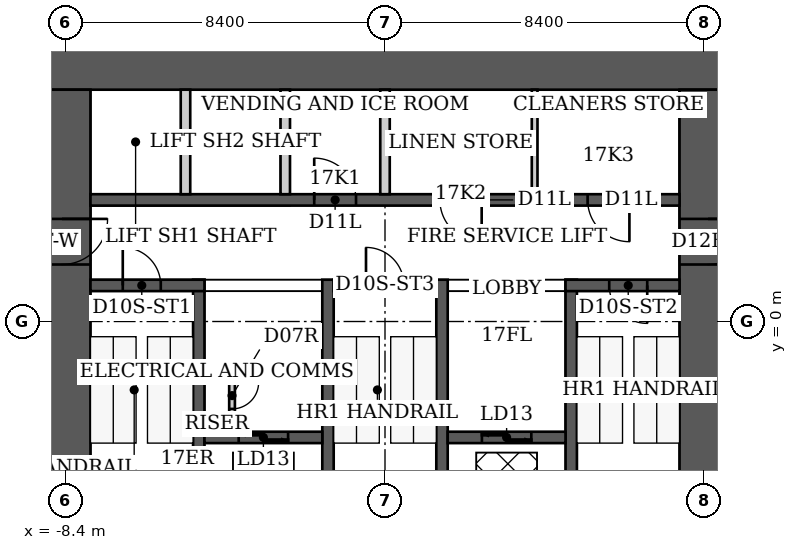
"""IFC4 building model, lengths in metres.
Left out: names, types, materials, properties, quantities, classifications, styles, units other than length and angle.
Written with IfcOpenShell. Run it as: python <this file> out.ifc"""

import sys

from ifc_helpers import new_model, si_unit, direction, frame, frame_2d, origin, place, context, subcontext, project, spatial, rectangle, extrude, element, fill, save


model = new_model("IFC4")
c1 = context("Model", 3, precision=1e-05, world=origin(), true_north=direction((0.0, 1.0)))
c2 = subcontext(c1, "Body", "Model", "MODEL_VIEW")
j1 = project(units=[si_unit("LENGTHUNIT", "METRE"), si_unit("PLANEANGLEUNIT", "RADIAN")], contexts=[c1])
p1 = place(None, origin())
s1 = spatial("IfcSite", under=j1, at=p1, CompositionType="ELEMENT")
p2 = place(p1, origin())
s2 = spatial("IfcBuilding", under=s1, at=p2, CompositionType="ELEMENT")
p3 = place(p2, frame((0.0, 0.0, 72.4)))
s3 = spatial("IfcBuildingStorey", under=s2, at=p3, CompositionType="ELEMENT", Elevation=72.4)
p4 = place(p3, frame((-9.25, 6.85, 0.0), z_axis=(0.0, 0.0, 1.0), x_axis=(1.0, 0.0, 0.0)))
e1 = element("IfcWall", 1, at=p4, inside=s3, PredefinedType="SHEAR", context=c2, shape_type="SweptSolid", body=[
    extrude(rectangle(XDim=18.5, YDim=1.5, at=frame_2d((9.25, 0.0))), origin(), (0.0, 0.0, 1.0), 3.8),
])
p5 = place(p3, frame((-8.5, -9.2, 0.0), z_axis=(0.0, 0.0, 1.0), x_axis=(0.0, 1.0, 0.0)))
e2 = element("IfcWall", 2, at=p5, inside=s3, PredefinedType="SHEAR", context=c2, shape_type="SweptSolid", body=[
    extrude(rectangle(XDim=15.3, YDim=1.5, at=frame_2d((7.65, 0.0))), origin(), (0.0, 0.0, 1.0), 3.8),
])
p6 = place(p5, frame((10.7, 0.0, 0.0)))
e3 = element("IfcOpeningElement", 3, at=p6, cuts=e2, PredefinedType="OPENING", context=c2, shape_type="SweptSolid", body=[
    extrude(rectangle(XDim=1.2, YDim=2.2, at=frame_2d((0.6, 1.1))), frame((0.0, 0.75, 0.0), z_axis=(0.0, -1.0, 0.0), x_axis=(1.0, 0.0, 0.0)), (0.0, 0.0, 1.0), 1.5),
])
p7 = place(p3, frame((8.5, -9.2, 0.0), z_axis=(0.0, 0.0, 1.0), x_axis=(0.0, 1.0, 0.0)))
e4 = element("IfcWall", 4, at=p7, inside=s3, PredefinedType="SHEAR", context=c2, shape_type="SweptSolid", body=[
    extrude(rectangle(XDim=15.3, YDim=1.5, at=frame_2d((7.65, 0.0))), origin(), (0.0, 0.0, 1.0), 3.8),
])
p8 = place(p7, frame((10.7, 0.0, 0.0)))
e5 = element("IfcOpeningElement", 5, at=p8, cuts=e4, PredefinedType="OPENING", context=c2, shape_type="SweptSolid", body=[
    extrude(rectangle(XDim=1.2, YDim=2.2, at=frame_2d((0.6, 1.1))), frame((0.0, 0.75, 0.0), z_axis=(0.0, -1.0, 0.0), x_axis=(1.0, 0.0, 0.0)), (0.0, 0.0, 1.0), 1.5),
])
for number, where, z_axis, x_axis in (
    (6, (-4.9, -6.1, 0.0), (0.0, 0.0, 1.0), (0.0, 1.0, 0.0)),
    (7, (-1.5, -6.1, 0.0), (0.0, 0.0, 1.0), (0.0, 1.0, 0.0)),
    (8, (1.5, -6.1, 0.0), (0.0, 0.0, 1.0), (0.0, 1.0, 0.0)),
    (9, (4.9, -6.1, 0.0), (0.0, 0.0, 1.0), (0.0, 1.0, 0.0)),
):
    element("IfcWall", number, at=place(p3, frame(where, z_axis=z_axis, x_axis=x_axis)), inside=s3, PredefinedType="SHEAR", context=c2, shape_type="SweptSolid", body=[
        extrude(rectangle(XDim=7.2, YDim=0.3, at=frame_2d((3.6, 0.0))), origin(), (0.0, 0.0, 1.0), 3.8),
    ])
p9 = place(p3, frame((-7.75, 0.95, 0.0), z_axis=(0.0, 0.0, 1.0), x_axis=(1.0, 0.0, 0.0)))
e10 = element("IfcWall", 10, at=p9, inside=s3, PredefinedType="SHEAR", context=c2, shape_type="SweptSolid", body=[
    extrude(rectangle(XDim=3.0, YDim=0.3, at=frame_2d((1.5, 0.0))), origin(), (0.0, 0.0, 1.0), 3.8),
])
p10 = place(p9, frame((0.85, 0.0, 0.0)))
e11 = element("IfcOpeningElement", 11, at=p10, cuts=e10, PredefinedType="OPENING", context=c2, shape_type="SweptSolid", body=[
    extrude(rectangle(XDim=1.0, YDim=2.2, at=frame_2d((0.5, 1.1))), frame((0.0, 0.15, 0.0), z_axis=(0.0, -1.0, 0.0), x_axis=(1.0, 0.0, 0.0)), (0.0, 0.0, 1.0), 0.3),
])
p11 = place(p3, frame((-1.35, 0.95, 0.0), z_axis=(0.0, 0.0, 1.0), x_axis=(1.0, 0.0, 0.0)))
e12 = element("IfcWall", 12, at=p11, inside=s3, PredefinedType="SHEAR", context=c2, shape_type="SweptSolid", body=[
    extrude(rectangle(XDim=2.7, YDim=0.3, at=frame_2d((1.35, 0.0))), origin(), (0.0, 0.0, 1.0), 3.8),
])
p12 = place(p11, frame((0.85, 0.0, 0.0)))
e13 = element("IfcOpeningElement", 13, at=p12, cuts=e12, PredefinedType="OPENING", context=c2, shape_type="SweptSolid", body=[
    extrude(rectangle(XDim=1.0, YDim=2.2, at=frame_2d((0.5, 1.1))), frame((0.0, 0.15, 0.0), z_axis=(0.0, -1.0, 0.0), x_axis=(1.0, 0.0, 0.0)), (0.0, 0.0, 1.0), 0.3),
])
p13 = place(p3, frame((4.75, 0.95, 0.0), z_axis=(0.0, 0.0, 1.0), x_axis=(1.0, 0.0, 0.0)))
e14 = element("IfcWall", 14, at=p13, inside=s3, PredefinedType="SHEAR", context=c2, shape_type="SweptSolid", body=[
    extrude(rectangle(XDim=3.0, YDim=0.3, at=frame_2d((1.5, 0.0))), origin(), (0.0, 0.0, 1.0), 3.8),
])
p14 = place(p13, frame((1.15, 0.0, 0.0)))
e15 = element("IfcOpeningElement", 15, at=p14, cuts=e14, PredefinedType="OPENING", context=c2, shape_type="SweptSolid", body=[
    extrude(rectangle(XDim=1.0, YDim=2.2, at=frame_2d((0.5, 1.1))), frame((0.0, 0.15, 0.0), z_axis=(0.0, -1.0, 0.0), x_axis=(1.0, 0.0, 0.0)), (0.0, 0.0, 1.0), 0.3),
])
p15 = place(p3, frame((-4.75, -3.05, 0.0), z_axis=(0.0, 0.0, 1.0), x_axis=(1.0, 0.0, 0.0)))
e16 = element("IfcWall", 16, at=p15, inside=s3, PredefinedType="SHEAR", context=c2, shape_type="SweptSolid", body=[
    extrude(rectangle(XDim=3.1, YDim=0.3, at=frame_2d((1.55, 0.0))), origin(), (0.0, 0.0, 1.0), 3.8),
])
p16 = place(p15, frame((0.9, 0.0, 0.0)))
e17 = element("IfcOpeningElement", 17, at=p16, cuts=e16, PredefinedType="OPENING", context=c2, shape_type="SweptSolid", body=[
    extrude(rectangle(XDim=1.3, YDim=2.1, at=frame_2d((0.65, 1.05))), frame((0.0, 0.15, 0.0), z_axis=(0.0, -1.0, 0.0), x_axis=(1.0, 0.0, 0.0)), (0.0, 0.0, 1.0), 0.3),
])
p17 = place(p3, frame((1.65, -3.05, 0.0), z_axis=(0.0, 0.0, 1.0), x_axis=(1.0, 0.0, 0.0)))
e18 = element("IfcWall", 18, at=p17, inside=s3, PredefinedType="SHEAR", context=c2, shape_type="SweptSolid", body=[
    extrude(rectangle(XDim=3.1, YDim=0.3, at=frame_2d((1.55, 0.0))), origin(), (0.0, 0.0, 1.0), 3.8),
])
p18 = place(p17, frame((0.9, 0.0, 0.0)))
e19 = element("IfcOpeningElement", 19, at=p18, cuts=e18, PredefinedType="OPENING", context=c2, shape_type="SweptSolid", body=[
    extrude(rectangle(XDim=1.3, YDim=2.1, at=frame_2d((0.65, 1.05))), frame((0.0, 0.15, 0.0), z_axis=(0.0, -1.0, 0.0), x_axis=(1.0, 0.0, 0.0)), (0.0, 0.0, 1.0), 0.3),
])
p19 = place(p3, frame((-7.75, 3.2, 0.0), z_axis=(0.0, 0.0, 1.0), x_axis=(1.0, 0.0, 0.0)))
e20 = element("IfcWall", 20, at=p19, inside=s3, PredefinedType="SHEAR", context=c2, shape_type="SweptSolid", body=[
    extrude(rectangle(XDim=15.5, YDim=0.3, at=frame_2d((7.75, 0.0))), origin(), (0.0, 0.0, 1.0), 3.8),
])
p20 = place(p19, frame((5.887, 0.0, 0.0)))
e21 = element("IfcOpeningElement", 21, at=p20, cuts=e20, PredefinedType="OPENING", context=c2, shape_type="SweptSolid", body=[
    extrude(rectangle(XDim=1.1, YDim=2.2, at=frame_2d((0.55, 1.1))), frame((0.0, 0.15, 0.0), z_axis=(0.0, -1.0, 0.0), x_axis=(1.0, 0.0, 0.0)), (0.0, 0.0, 1.0), 0.3),
])
p21 = place(p19, frame((9.194, 0.0, 0.0)))
e22 = element("IfcOpeningElement", 22, at=p21, cuts=e20, PredefinedType="OPENING", context=c2, shape_type="SweptSolid", body=[
    extrude(rectangle(XDim=1.1, YDim=2.2, at=frame_2d((0.55, 1.1))), frame((0.0, 0.15, 0.0), z_axis=(0.0, -1.0, 0.0), x_axis=(1.0, 0.0, 0.0)), (0.0, 0.0, 1.0), 0.3),
])
p22 = place(p19, frame((13.081, 0.0, 0.0)))
e23 = element("IfcOpeningElement", 23, at=p22, cuts=e20, PredefinedType="OPENING", context=c2, shape_type="SweptSolid", body=[
    extrude(rectangle(XDim=1.1, YDim=2.2, at=frame_2d((0.55, 1.1))), frame((0.0, 0.15, 0.0), z_axis=(0.0, -1.0, 0.0), x_axis=(1.0, 0.0, 0.0)), (0.0, 0.0, 1.0), 0.3),
])
for number, where, z_axis, x_axis in (
    (24, (-5.25, 3.35, 0.0), (0.0, 0.0, 1.0), (0.0, 1.0, 0.0)),
    (25, (-2.625, 3.35, 0.0), (0.0, 0.0, 1.0), (0.0, 1.0, 0.0)),
    (26, (0.0, 3.35, 0.0), (0.0, 0.0, 1.0), (0.0, 1.0, 0.0)),
):
    element("IfcWall", number, at=place(p3, frame(where, z_axis=z_axis, x_axis=x_axis)), inside=s3, PredefinedType="PARTITIONING", context=c2, shape_type="SweptSolid", body=[
        extrude(rectangle(XDim=2.75, YDim=0.25, at=frame_2d((1.375, 0.0))), origin(), (0.0, 0.0, 1.0), 3.8),
    ])
p23 = place(p3, frame((-4.025, -2.9, 0.0), z_axis=(0.0, 0.0, 1.0), x_axis=(0.0, 1.0, 0.0)))
e27 = element("IfcWall", 27, at=p23, inside=s3, PredefinedType="PARTITIONING", context=c2, shape_type="SweptSolid", body=[
    extrude(rectangle(XDim=1.775, YDim=0.15, at=frame_2d((0.887, 0.0))), origin(), (0.0, 0.0, 1.0), 3.64),
])
p24 = place(p23, frame((0.6, 0.0, 0.0)))
e28 = element("IfcOpeningElement", 28, at=p24, cuts=e27, PredefinedType="OPENING", context=c2, shape_type="SweptSolid", body=[
    extrude(rectangle(XDim=0.7, YDim=2.1, at=frame_2d((0.35, 1.05))), frame((0.0, 0.075, 0.0), z_axis=(0.0, -1.0, 0.0), x_axis=(1.0, 0.0, 0.0)), (0.0, 0.0, 1.0), 0.15),
])
p25 = place(p3, frame((-4.75, -1.2, 0.0), z_axis=(0.0, 0.0, 1.0), x_axis=(1.0, 0.0, 0.0)))
e29 = element("IfcWall", 29, at=p25, inside=s3, PredefinedType="PARTITIONING", context=c2, shape_type="SweptSolid", body=[
    extrude(rectangle(XDim=0.8, YDim=0.15, at=frame_2d((0.4, 0.0))), origin(), (0.0, 0.0, 1.0), 3.64),
])
p26 = place(p3, frame((3.938, 3.35, 0.0), z_axis=(0.0, 0.0, 1.0), x_axis=(0.0, 1.0, 0.0)))
e30 = element("IfcWall", 30, at=p26, inside=s3, PredefinedType="PARTITIONING", context=c2, shape_type="SweptSolid", body=[
    extrude(rectangle(XDim=2.75, YDim=0.15, at=frame_2d((1.375, 0.0))), origin(), (0.0, 0.0, 1.0), 3.64),
])
p27 = place(p10, origin())
e31 = element("IfcDoor", 31, at=p27, inside=s3, OperationType="SINGLE_SWING_LEFT", PredefinedType="DOOR", context=c2, shape_type="SweptSolid", body=[
    extrude(rectangle(XDim=1.0, YDim=2.2, at=frame_2d((0.5, 1.1))), frame((0.0, 0.025, 0.0), z_axis=(0.0, -1.0, 0.0), x_axis=(1.0, 0.0, 0.0)), (0.0, 0.0, 1.0), 0.05),
])
fill(e11, e31)
p28 = place(p12, origin())
e32 = element("IfcDoor", 32, at=p28, inside=s3, OperationType="SINGLE_SWING_LEFT", PredefinedType="DOOR", context=c2, shape_type="SweptSolid", body=[
    extrude(rectangle(XDim=1.0, YDim=2.2, at=frame_2d((0.5, 1.1))), frame((0.0, 0.025, 0.0), z_axis=(0.0, -1.0, 0.0), x_axis=(1.0, 0.0, 0.0)), (0.0, 0.0, 1.0), 0.05),
])
fill(e13, e32)
p29 = place(p14, origin())
e33 = element("IfcDoor", 33, at=p29, inside=s3, OperationType="SINGLE_SWING_RIGHT", PredefinedType="DOOR", context=c2, shape_type="SweptSolid", body=[
    extrude(rectangle(XDim=1.0, YDim=2.2, at=frame_2d((0.5, 1.1))), frame((0.0, 0.025, 0.0), z_axis=(0.0, -1.0, 0.0), x_axis=(1.0, 0.0, 0.0)), (0.0, 0.0, 1.0), 0.05),
])
fill(e15, e33)
p30 = place(p6, origin())
e34 = element("IfcDoor", 34, at=p30, inside=s3, OperationType="SINGLE_SWING_RIGHT", PredefinedType="DOOR", context=c2, shape_type="SweptSolid", body=[
    extrude(rectangle(XDim=1.2, YDim=2.2, at=frame_2d((0.6, 1.1))), frame((0.0, 0.025, 0.0), z_axis=(0.0, -1.0, 0.0), x_axis=(1.0, 0.0, 0.0)), (0.0, 0.0, 1.0), 0.05),
])
fill(e3, e34)
p31 = place(p8, origin())
e35 = element("IfcDoor", 35, at=p31, inside=s3, OperationType="SINGLE_SWING_RIGHT", PredefinedType="DOOR", context=c2, shape_type="SweptSolid", body=[
    extrude(rectangle(XDim=1.2, YDim=2.2, at=frame_2d((0.6, 1.1))), frame((0.0, 0.025, 0.0), z_axis=(0.0, -1.0, 0.0), x_axis=(1.0, 0.0, 0.0)), (0.0, 0.0, 1.0), 0.05),
])
fill(e5, e35)
p32 = place(p24, origin())
e36 = element("IfcDoor", 36, at=p32, inside=s3, OperationType="SINGLE_SWING_RIGHT", PredefinedType="DOOR", context=c2, shape_type="SweptSolid", body=[
    extrude(rectangle(XDim=0.7, YDim=2.1, at=frame_2d((0.35, 1.05))), frame((0.0, 0.025, 0.0), z_axis=(0.0, -1.0, 0.0), x_axis=(1.0, 0.0, 0.0)), (0.0, 0.0, 1.0), 0.05),
])
fill(e28, e36)
p33 = place(p20, origin())
e37 = element("IfcDoor", 37, at=p33, inside=s3, OperationType="SINGLE_SWING_LEFT", PredefinedType="DOOR", context=c2, shape_type="SweptSolid", body=[
    extrude(rectangle(XDim=1.1, YDim=2.2, at=frame_2d((0.55, 1.1))), frame((0.0, 0.025, 0.0), z_axis=(0.0, -1.0, 0.0), x_axis=(1.0, 0.0, 0.0)), (0.0, 0.0, 1.0), 0.05),
])
fill(e21, e37)
p34 = place(p21, origin())
e38 = element("IfcDoor", 38, at=p34, inside=s3, OperationType="SINGLE_SWING_RIGHT", PredefinedType="DOOR", context=c2, shape_type="SweptSolid", body=[
    extrude(rectangle(XDim=1.1, YDim=2.2, at=frame_2d((0.55, 1.1))), frame((0.0, 0.025, 0.0), z_axis=(0.0, -1.0, 0.0), x_axis=(1.0, 0.0, 0.0)), (0.0, 0.0, 1.0), 0.05),
])
fill(e22, e38)
p35 = place(p22, origin())
e39 = element("IfcDoor", 39, at=p35, inside=s3, OperationType="SINGLE_SWING_RIGHT", PredefinedType="DOOR", context=c2, shape_type="SweptSolid", body=[
    extrude(rectangle(XDim=1.1, YDim=2.2, at=frame_2d((0.55, 1.1))), frame((0.0, 0.025, 0.0), z_axis=(0.0, -1.0, 0.0), x_axis=(1.0, 0.0, 0.0)), (0.0, 0.0, 1.0), 0.05),
])
fill(e23, e39)
p36 = place(p16, origin())
e40 = element("IfcDoor", 40, at=p36, inside=s3, OperationType="DOUBLE_DOOR_SLIDING", PredefinedType="DOOR", context=c2, shape_type="SweptSolid", body=[
    extrude(rectangle(XDim=1.3, YDim=2.1, at=frame_2d((0.65, 1.05))), frame((0.0, 0.025, 0.0), z_axis=(0.0, -1.0, 0.0), x_axis=(1.0, 0.0, 0.0)), (0.0, 0.0, 1.0), 0.05),
])
fill(e17, e40)
p37 = place(p18, origin())
e41 = element("IfcDoor", 41, at=p37, inside=s3, OperationType="DOUBLE_DOOR_SLIDING", PredefinedType="DOOR", context=c2, shape_type="SweptSolid", body=[
    extrude(rectangle(XDim=1.3, YDim=2.1, at=frame_2d((0.65, 1.05))), frame((0.0, 0.025, 0.0), z_axis=(0.0, -1.0, 0.0), x_axis=(1.0, 0.0, 0.0)), (0.0, 0.0, 1.0), 0.05),
])
fill(e19, e41)
save(model, sys.argv[1])
